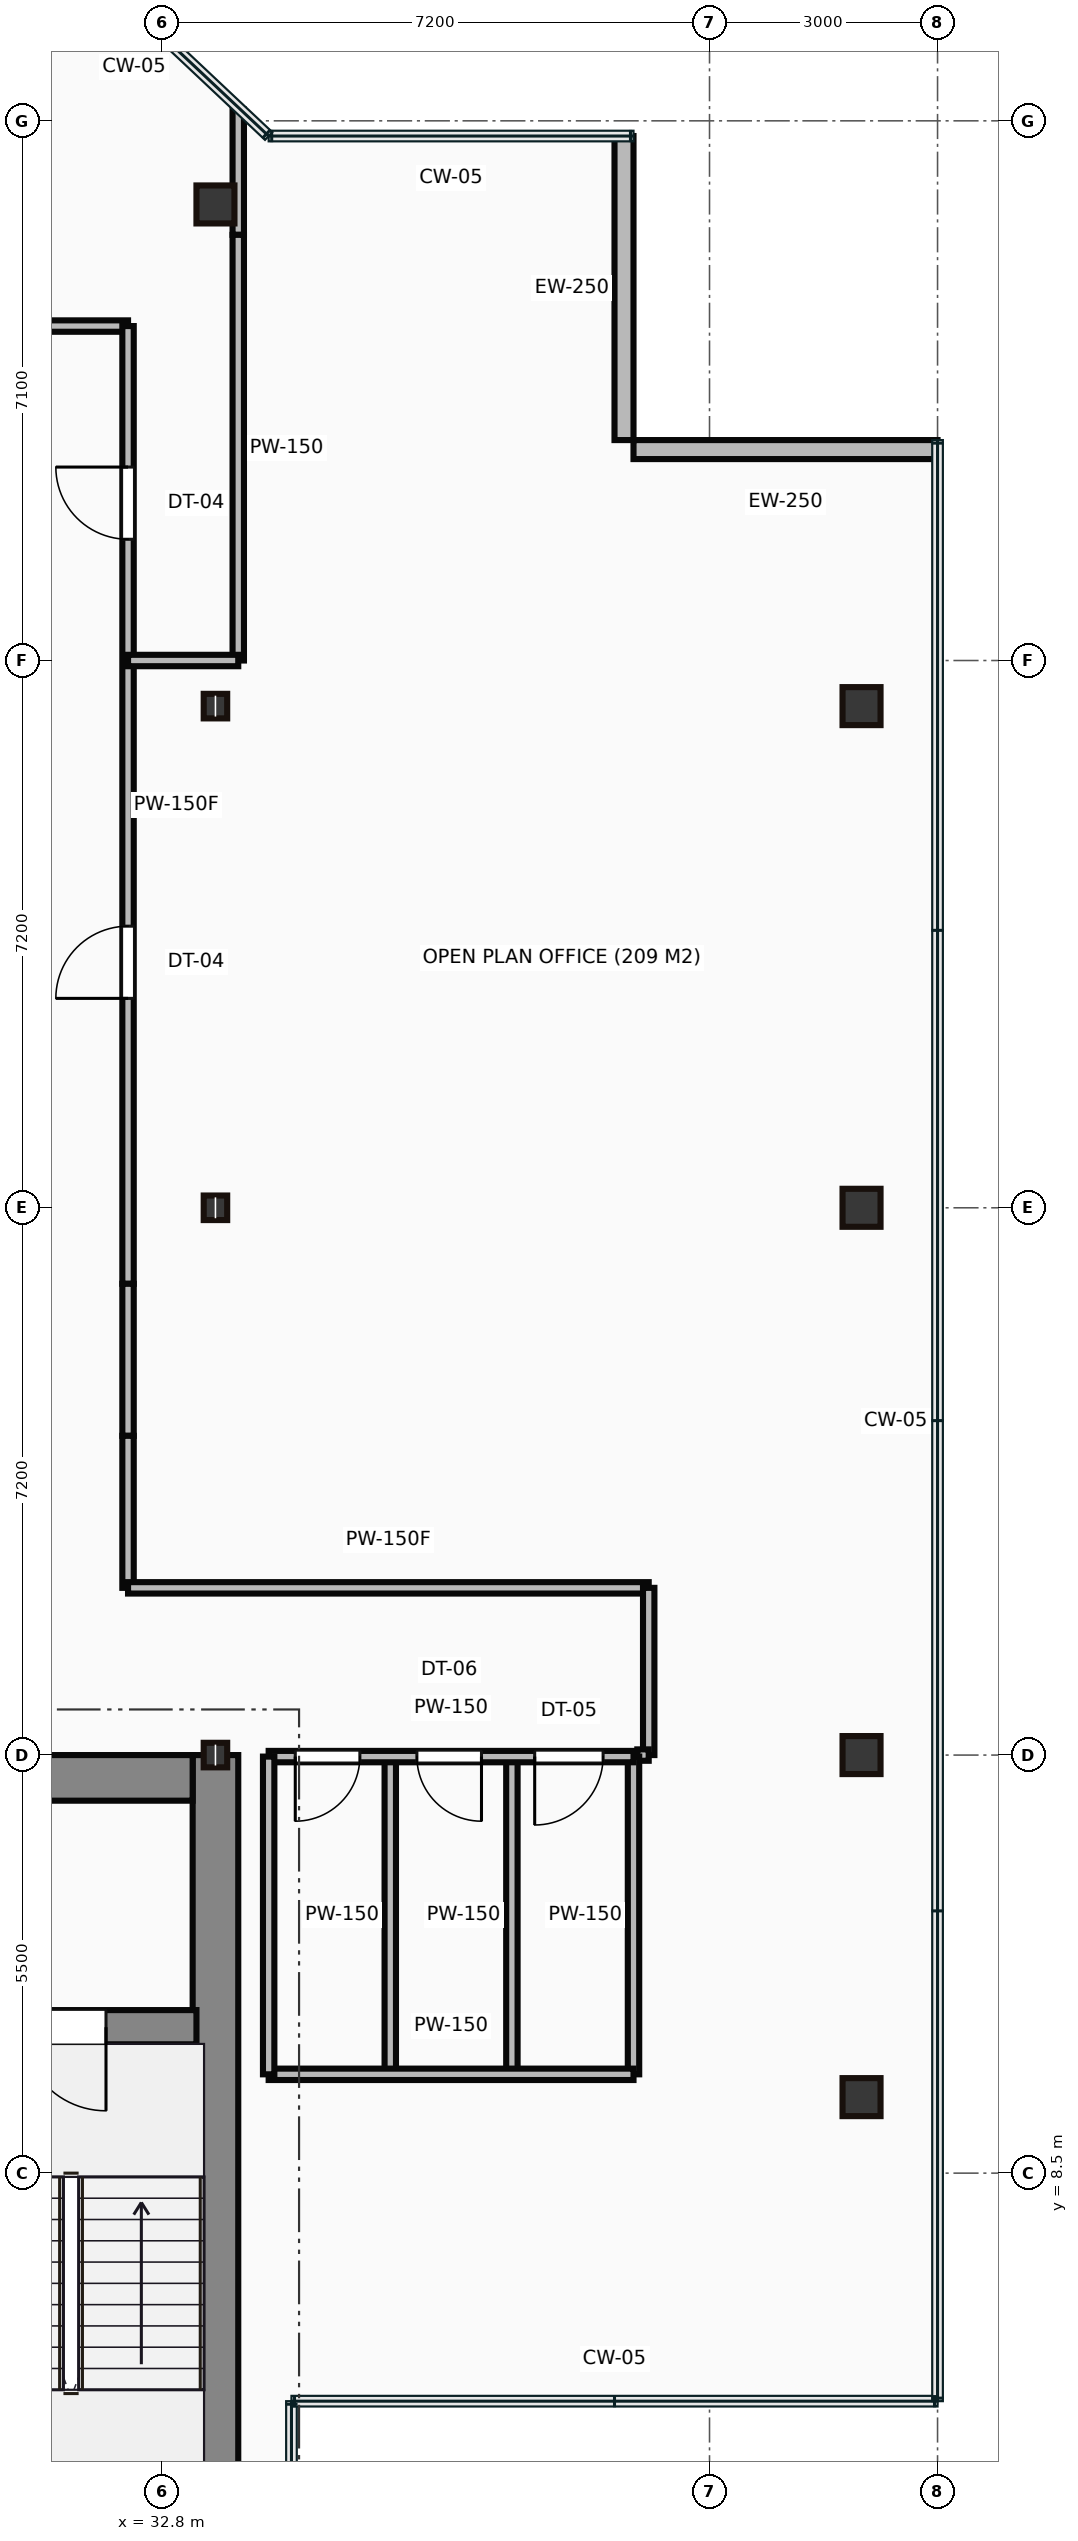
"""IFC4 building model, lengths in metres.
Left out: names, types, materials, properties, quantities, classifications, styles, units other than length and angle.
Written with IfcOpenShell. Run it as: python <this file> out.ifc"""

import sys

from ifc_helpers import new_model, si_unit, direction, frame, frame_2d, origin, origin_2d, place, context, subcontext, project, spatial, rectangle, hollow_rectangle, i_section, extrude, source, transform, mapped, element, fill, save


model = new_model("IFC4")
c1 = context("Model", 3, precision=1e-05, world=origin(), true_north=direction((0.0, 1.0)))
c2 = subcontext(c1, "Body", "Model", "MODEL_VIEW")
j1 = project(units=[si_unit("LENGTHUNIT", "METRE"), si_unit("PLANEANGLEUNIT", "RADIAN")], contexts=[c1])
p1 = place(None, origin())
s1 = spatial("IfcSite", under=j1, at=p1, CompositionType="ELEMENT")
p2 = place(p1, origin())
s2 = spatial("IfcBuilding", under=s1, at=p2, CompositionType="ELEMENT")
p3 = place(p2, frame((0.0, 0.0, 284.35)))
s3 = spatial("IfcBuildingStorey", under=s2, at=p3, CompositionType="ELEMENT", Elevation=284.35)
m1 = source(origin(), c2, "Body", "SweptSolid", [
    extrude(rectangle(XDim=13.1, YDim=0.6, at=frame_2d((6.55, 0.0))), origin(), (0.0, 0.0, 1.0), 3.65),
])
p4 = place(p3, frame((33.5, 0.9, 0.0), z_axis=(0.0, 0.0, 1.0), x_axis=(0.0, 1.0, 0.0)))
e1 = element("IfcWall", 1, at=p4, inside=s3, PredefinedType="SHEAR", context=c2, shape_type="MappedRepresentation", body=[
    mapped(m1, transform((0.0, 0.0, 0.0))),
])
m2 = source(origin(), c2, "Body", "SweptSolid", [
    extrude(rectangle(XDim=12.6, YDim=0.6, at=frame_2d((6.3, 0.0))), origin(), (0.0, 0.0, 1.0), 3.65),
])
p5 = place(p3, frame((20.6, 13.7, 0.0), z_axis=(0.0, 0.0, 1.0), x_axis=(1.0, 0.0, 0.0)))
e2 = element("IfcWall", 2, at=p5, inside=s3, PredefinedType="SHEAR", context=c2, shape_type="MappedRepresentation", body=[
    mapped(m2, transform((0.0, 0.0, 0.0))),
])
p6 = place(p5, frame((9.25, 0.0, 0.0)))
e3 = element("IfcOpeningElement", 3, at=p6, cuts=e2, PredefinedType="OPENING", context=c2, shape_type="SweptSolid", body=[
    extrude(rectangle(XDim=1.1, YDim=2.15, at=frame_2d((0.55, 1.075))), frame((0.0, 0.31, 0.0), z_axis=(0.0, -1.0, 0.0), x_axis=(1.0, 0.0, 0.0)), (0.0, 0.0, 1.0), 0.62),
])
m3 = source(origin(), c2, "Body", "SweptSolid", [
    extrude(rectangle(XDim=3.39, YDim=0.45, at=frame_2d((1.695, 0.0))), origin(), (0.0, 0.0, 1.0), 3.65),
])
p7 = place(p3, frame((29.86, 10.42, 0.0), z_axis=(0.0, 0.0, 1.0), x_axis=(1.0, 0.0, 0.0)))
e4 = element("IfcWall", 4, at=p7, inside=s3, PredefinedType="SHEAR", context=c2, shape_type="MappedRepresentation", body=[
    mapped(m3, transform((0.0, 0.0, 0.0))),
])
p8 = place(p7, frame((1.1, 0.0, 0.0)))
e5 = element("IfcOpeningElement", 5, at=p8, cuts=e4, PredefinedType="OPENING", context=c2, shape_type="SweptSolid", body=[
    extrude(rectangle(XDim=1.1, YDim=2.15, at=frame_2d((0.55, 1.075))), frame((0.0, 0.235, 0.0), z_axis=(0.0, -1.0, 0.0), x_axis=(1.0, 0.0, 0.0)), (0.0, 0.0, 1.0), 0.47),
])
m4 = source(origin(), c2, "Body", "SweptSolid", [
    extrude(i_section(OverallWidth=0.309, OverallDepth=0.323, WebThickness=0.014, FlangeThickness=0.023, at=origin_2d()), origin(), (0.0, 0.0, 1.0), 3.65),
])
for number, where, z_axis, x_axis in (
    (6, (33.5, 14.0, 0.0), (0.0, 0.0, 1.0), (1.0, 0.0, 0.0)),
    (7, (33.5, 21.2, 0.0), (0.0, 0.0, 1.0), (1.0, 0.0, 0.0)),
    (8, (33.5, 27.8, 0.0), (0.0, 0.0, 1.0), (1.0, 0.0, 0.0)),
):
    element("IfcColumn", number, at=place(p3, frame(where, z_axis=z_axis, x_axis=x_axis)), inside=s3, PredefinedType="COLUMN", context=c2, shape_type="MappedRepresentation", body=[
        mapped(m4, transform((0.0, 0.0, 0.0))),
    ])
m5 = source(origin(), c2, "Body", "SweptSolid", [
    extrude(hollow_rectangle(XDim=0.5, YDim=0.5, WallThickness=0.022, at=origin_2d()), origin(), (0.0, 0.0, 1.0), 3.65),
])
for number, where, z_axis, x_axis in (
    (9, (33.5, 34.4, 0.0), (0.0, 0.0, 1.0), (1.0, 0.0, 0.0)),
    (10, (42.0, 9.5, 0.0), (0.0, 0.0, 1.0), (1.0, 0.0, 0.0)),
    (11, (42.0, 14.0, 0.0), (0.0, 0.0, 1.0), (1.0, 0.0, 0.0)),
    (12, (42.0, 21.2, 0.0), (0.0, 0.0, 1.0), (1.0, 0.0, 0.0)),
    (13, (42.0, 27.8, 0.0), (0.0, 0.0, 1.0), (1.0, 0.0, 0.0)),
):
    element("IfcColumn", number, at=place(p3, frame(where, z_axis=z_axis, x_axis=x_axis)), inside=s3, PredefinedType="COLUMN", context=c2, shape_type="MappedRepresentation", body=[
        mapped(m5, transform((0.0, 0.0, 0.0))),
    ])
m6 = source(origin(), c2, "Body", "SweptSolid", [
    extrude(rectangle(XDim=4.0, YDim=0.25, at=frame_2d((2.0, 0.0))), origin(), (0.0, 0.0, 1.0), 3.4),
])
for number, where, z_axis, x_axis in (
    (14, (43.0, 31.175, 0.0), (0.0, 0.0, 1.0), (-1.0, 0.0, 0.0)),
    (15, (38.875, 31.3, 0.0), (0.0, 0.0, 1.0), (0.0, 1.0, 0.0)),
):
    element("IfcWall", number, at=place(p3, frame(where, z_axis=z_axis, x_axis=x_axis)), inside=s3, PredefinedType="STANDARD", context=c2, shape_type="MappedRepresentation", body=[
        mapped(m6, transform((0.0, 0.0, 0.0))),
    ])
m7 = source(origin(), c2, "Body", "SweptSolid", [
    extrude(rectangle(XDim=4.8, YDim=0.15, at=frame_2d((2.4, 0.0))), origin(), (0.0, 0.0, 1.0), 2.787),
])
p9 = place(p3, frame((34.2, 13.98, 0.0), z_axis=(0.0, 0.0, 1.0), x_axis=(1.0, 0.0, 0.0)))
e16 = element("IfcWall", 16, at=p9, inside=s3, PredefinedType="PARTITIONING", context=c2, shape_type="MappedRepresentation", body=[
    mapped(m7, transform((0.0, 0.0, 0.0))),
])
p10 = place(p9, frame((0.35, 0.0, 0.0)))
e17 = element("IfcOpeningElement", 17, at=p10, cuts=e16, PredefinedType="OPENING", context=c2, shape_type="SweptSolid", body=[
    extrude(rectangle(XDim=0.85, YDim=2.1, at=frame_2d((0.425, 1.05))), frame((0.0, 0.085, 0.0), z_axis=(0.0, -1.0, 0.0), x_axis=(1.0, 0.0, 0.0)), (0.0, 0.0, 1.0), 0.17),
])
p11 = place(p9, frame((1.95, 0.0, 0.0)))
e18 = element("IfcOpeningElement", 18, at=p11, cuts=e16, PredefinedType="OPENING", context=c2, shape_type="SweptSolid", body=[
    extrude(rectangle(XDim=0.85, YDim=2.1, at=frame_2d((0.425, 1.05))), frame((0.0, 0.085, 0.0), z_axis=(0.0, -1.0, 0.0), x_axis=(1.0, 0.0, 0.0)), (0.0, 0.0, 1.0), 0.17),
])
p12 = place(p9, frame((3.5, 0.0, 0.0)))
e19 = element("IfcOpeningElement", 19, at=p12, cuts=e16, PredefinedType="OPENING", context=c2, shape_type="SweptSolid", body=[
    extrude(rectangle(XDim=0.9, YDim=2.1, at=frame_2d((0.45, 1.05))), frame((0.0, 0.085, 0.0), z_axis=(0.0, -1.0, 0.0), x_axis=(1.0, 0.0, 0.0)), (0.0, 0.0, 1.0), 0.17),
])
m8 = source(origin(), c2, "Body", "SweptSolid", [
    extrude(rectangle(XDim=4.8, YDim=0.15, at=frame_2d((2.4, 0.0))), origin(), (0.0, 0.0, 1.0), 3.4),
])
p13 = place(p3, frame((34.2, 9.8, 0.0), z_axis=(0.0, 0.0, 1.0), x_axis=(1.0, 0.0, 0.0)))
e20 = element("IfcWall", 20, at=p13, inside=s3, PredefinedType="PARTITIONING", context=c2, shape_type="MappedRepresentation", body=[
    mapped(m8, transform((0.0, 0.0, 0.0))),
])
m9 = source(origin(), c2, "Body", "SweptSolid", [
    extrude(rectangle(XDim=4.18, YDim=0.15, at=frame_2d((2.09, 0.0))), origin(), (0.0, 0.0, 1.0), 3.4),
])
for number, where, z_axis, x_axis in (
    (21, (39.0, 9.8, 0.0), (0.0, 0.0, 1.0), (0.0, 1.0, 0.0)),
    (22, (34.2, 9.8, 0.0), (0.0, 0.0, 1.0), (0.0, 1.0, 0.0)),
    (23, (35.8, 9.8, 0.0), (0.0, 0.0, 1.0), (0.0, 1.0, 0.0)),
    (24, (37.4, 9.8, 0.0), (0.0, 0.0, 1.0), (0.0, 1.0, 0.0)),
):
    element("IfcWall", number, at=place(p3, frame(where, z_axis=z_axis, x_axis=x_axis)), inside=s3, PredefinedType="PARTITIONING", context=c2, shape_type="MappedRepresentation", body=[
        mapped(m9, transform((0.0, 0.0, 0.0))),
    ])
m10 = source(origin(), c2, "Body", "SweptSolid", [
    extrude(rectangle(XDim=2.15, YDim=0.15, at=frame_2d((1.075, 0.0))), origin(), (0.0, 0.0, 1.0), 3.4),
])
p14 = place(p3, frame((30.2, 32.8, 0.0), z_axis=(0.0, 0.0, 1.0), x_axis=(1.0, 0.0, 0.0)))
e25 = element("IfcWall", 25, at=p14, inside=s3, PredefinedType="PARTITIONING", context=c2, shape_type="MappedRepresentation", body=[
    mapped(m10, transform((0.0, 0.0, 0.0))),
])
m11 = source(origin(), c2, "Body", "SweptSolid", [
    extrude(rectangle(XDim=12.6, YDim=0.15, at=frame_2d((6.3, 0.0))), origin(), (0.0, 0.0, 1.0), 3.4),
])
p15 = place(p3, frame((32.35, 32.8, 0.0), z_axis=(0.0, 0.0, 1.0), x_axis=(0.0, -1.0, 0.0)))
e26 = element("IfcWall", 26, at=p15, inside=s3, PredefinedType="PARTITIONING", context=c2, shape_type="MappedRepresentation", body=[
    mapped(m11, transform((0.0, 0.0, 0.0))),
])
p16 = place(p15, frame((1.855, 0.0, 0.0)))
e27 = element("IfcOpeningElement", 27, at=p16, cuts=e26, PredefinedType="OPENING", context=c2, shape_type="SweptSolid", body=[
    extrude(rectangle(XDim=0.95, YDim=2.15, at=frame_2d((0.475, 1.075))), frame((0.0, 0.085, 0.0), z_axis=(0.0, -1.0, 0.0), x_axis=(1.0, 0.0, 0.0)), (0.0, 0.0, 1.0), 0.17),
])
p17 = place(p15, frame((7.895, 0.0, 0.0)))
e28 = element("IfcOpeningElement", 28, at=p17, cuts=e26, PredefinedType="OPENING", context=c2, shape_type="SweptSolid", body=[
    extrude(rectangle(XDim=0.95, YDim=2.15, at=frame_2d((0.475, 1.075))), frame((0.0, 0.085, 0.0), z_axis=(0.0, -1.0, 0.0), x_axis=(1.0, 0.0, 0.0)), (0.0, 0.0, 1.0), 0.17),
])
m12 = source(origin(), c2, "Body", "SweptSolid", [
    extrude(rectangle(XDim=2.0, YDim=0.15, at=frame_2d((1.0, 0.0))), origin(), (0.0, 0.0, 1.0), 3.4),
])
for number, where, z_axis, x_axis in (
    (29, (32.35, 20.2, 0.0), (0.0, 0.0, 1.0), (0.0, -1.0, 0.0)),
    (30, (32.35, 18.2, 0.0), (0.0, 0.0, 1.0), (0.0, -1.0, 0.0)),
):
    element("IfcWall", number, at=place(p3, frame(where, z_axis=z_axis, x_axis=x_axis)), inside=s3, PredefinedType="PARTITIONING", context=c2, shape_type="MappedRepresentation", body=[
        mapped(m12, transform((0.0, 0.0, 0.0))),
    ])
m13 = source(origin(), c2, "Body", "SweptSolid", [
    extrude(rectangle(XDim=6.85, YDim=0.15, at=frame_2d((3.425, 0.0))), origin(), (0.0, 0.0, 1.0), 3.4),
])
p18 = place(p3, frame((32.35, 16.2, 0.0), z_axis=(0.0, 0.0, 1.0), x_axis=(1.0, 0.0, 0.0)))
e31 = element("IfcWall", 31, at=p18, inside=s3, PredefinedType="PARTITIONING", context=c2, shape_type="MappedRepresentation", body=[
    mapped(m13, transform((0.0, 0.0, 0.0))),
])
m14 = source(origin(), c2, "Body", "SweptSolid", [
    extrude(rectangle(XDim=2.2, YDim=0.15, at=frame_2d((1.1, 0.0))), origin(), (0.0, 0.0, 1.0), 3.4),
])
p19 = place(p3, frame((39.2, 16.2, 0.0), z_axis=(0.0, 0.0, 1.0), x_axis=(0.0, -1.0, 0.0)))
e32 = element("IfcWall", 32, at=p19, inside=s3, PredefinedType="PARTITIONING", context=c2, shape_type="MappedRepresentation", body=[
    mapped(m14, transform((0.0, 0.0, 0.0))),
])
m15 = source(origin(), c2, "Body", "SweptSolid", [
    extrude(rectangle(XDim=0.15, YDim=0.15, at=frame_2d((0.075, 0.0))), origin(), (0.0, 0.0, 1.0), 3.4),
])
p20 = place(p3, frame((39.2, 14.0, 0.0), z_axis=(0.0, 0.0, 1.0), x_axis=(-1.0, 0.0, 0.0)))
e33 = element("IfcWall", 33, at=p20, inside=s3, PredefinedType="PARTITIONING", context=c2, shape_type="MappedRepresentation", body=[
    mapped(m15, transform((0.0, 0.0, 0.0))),
])
m16 = source(origin(), c2, "Body", "SweptSolid", [
    extrude(rectangle(XDim=1.649, YDim=0.15, at=frame_2d((0.825, 0.0))), origin(), (0.0, 0.0, 1.0), 3.4),
])
p21 = place(p3, frame((33.8, 35.649, 0.0), z_axis=(0.0, 0.0, 1.0), x_axis=(0.0, -1.0, 0.0)))
e34 = element("IfcWall", 34, at=p21, inside=s3, PredefinedType="PARTITIONING", context=c2, shape_type="MappedRepresentation", body=[
    mapped(m16, transform((0.0, 0.0, 0.0))),
])
m17 = source(origin(), c2, "Body", "SweptSolid", [
    extrude(rectangle(XDim=5.6, YDim=0.15, at=frame_2d((2.8, 0.0))), origin(), (0.0, 0.0, 1.0), 3.4),
])
p22 = place(p3, frame((33.8, 34.0, 0.0), z_axis=(0.0, 0.0, 1.0), x_axis=(0.0, -1.0, 0.0)))
e35 = element("IfcWall", 35, at=p22, inside=s3, PredefinedType="PARTITIONING", context=c2, shape_type="MappedRepresentation", body=[
    mapped(m17, transform((0.0, 0.0, 0.0))),
])
m18 = source(origin(), c2, "Body", "SweptSolid", [
    extrude(rectangle(XDim=1.45, YDim=0.15, at=frame_2d((0.725, 0.0))), origin(), (0.0, 0.0, 1.0), 3.4),
])
p23 = place(p3, frame((33.8, 28.4, 0.0), z_axis=(0.0, 0.0, 1.0), x_axis=(-1.0, 0.0, 0.0)))
e36 = element("IfcWall", 36, at=p23, inside=s3, PredefinedType="PARTITIONING", context=c2, shape_type="MappedRepresentation", body=[
    mapped(m18, transform((0.0, 0.0, 0.0))),
])
m19 = source(origin(), c2, "Body", "SweptSolid", [
    extrude(rectangle(XDim=1.1, YDim=2.15, at=frame_2d((0.55, 1.075))), frame((0.0, 0.025, 0.0), z_axis=(0.0, -1.0, 0.0), x_axis=(1.0, 0.0, 0.0)), (0.0, 0.0, 1.0), 0.05),
])
p24 = place(p8, frame((1.1, 0.0, 0.0), z_axis=(0.0, 0.0, 1.0), x_axis=(-1.0, 0.0, 0.0)))
e37 = element("IfcDoor", 37, at=p24, inside=s3, OperationType="SINGLE_SWING_RIGHT", PredefinedType="DOOR", context=c2, shape_type="MappedRepresentation", body=[
    mapped(m19, transform((0.0, 0.0, 0.0))),
])
fill(e5, e37)
m20 = source(origin(), c2, "Body", "SweptSolid", [
    extrude(rectangle(XDim=0.85, YDim=2.1, at=frame_2d((0.425, 1.05))), frame((0.0, 0.025, 0.0), z_axis=(0.0, -1.0, 0.0), x_axis=(1.0, 0.0, 0.0)), (0.0, 0.0, 1.0), 0.05),
])
p25 = place(p10, frame((0.85, 0.0, 0.0), z_axis=(0.0, 0.0, 1.0), x_axis=(-1.0, 0.0, 0.0)))
e38 = element("IfcDoor", 38, at=p25, inside=s3, OperationType="SINGLE_SWING_LEFT", PredefinedType="DOOR", context=c2, shape_type="MappedRepresentation", body=[
    mapped(m20, transform((0.0, 0.0, 0.0))),
])
fill(e17, e38)
p26 = place(p11, frame((0.85, 0.0, 0.0), z_axis=(0.0, 0.0, 1.0), x_axis=(-1.0, 0.0, 0.0)))
e39 = element("IfcDoor", 39, at=p26, inside=s3, OperationType="SINGLE_SWING_RIGHT", PredefinedType="DOOR", context=c2, shape_type="MappedRepresentation", body=[
    mapped(m20, transform((0.0, 0.0, 0.0))),
])
fill(e18, e39)
m21 = source(origin(), c2, "Body", "SweptSolid", [
    extrude(rectangle(XDim=0.9, YDim=2.1, at=frame_2d((0.45, 1.05))), frame((0.0, 0.025, 0.0), z_axis=(0.0, -1.0, 0.0), x_axis=(1.0, 0.0, 0.0)), (0.0, 0.0, 1.0), 0.05),
])
p27 = place(p12, frame((0.9, 0.0, 0.0), z_axis=(0.0, 0.0, 1.0), x_axis=(-1.0, 0.0, 0.0)))
e40 = element("IfcDoor", 40, at=p27, inside=s3, OperationType="SINGLE_SWING_LEFT", PredefinedType="DOOR", context=c2, shape_type="MappedRepresentation", body=[
    mapped(m21, transform((0.0, 0.0, 0.0))),
])
fill(e19, e40)
m22 = source(origin(), c2, "Body", "SweptSolid", [
    extrude(rectangle(XDim=0.95, YDim=2.15, at=frame_2d((0.475, 1.075))), frame((0.0, 0.025, 0.0), z_axis=(0.0, -1.0, 0.0), x_axis=(1.0, 0.0, 0.0)), (0.0, 0.0, 1.0), 0.05),
])
p28 = place(p16, origin())
e41 = element("IfcDoor", 41, at=p28, inside=s3, OperationType="SINGLE_SWING_LEFT", PredefinedType="DOOR", context=c2, shape_type="MappedRepresentation", body=[
    mapped(m22, transform((0.0, 0.0, 0.0))),
])
fill(e27, e41)
p29 = place(p17, origin())
e42 = element("IfcDoor", 42, at=p29, inside=s3, OperationType="SINGLE_SWING_RIGHT", PredefinedType="DOOR", context=c2, shape_type="MappedRepresentation", body=[
    mapped(m22, transform((0.0, 0.0, 0.0))),
])
fill(e28, e42)
save(model, sys.argv[1])
